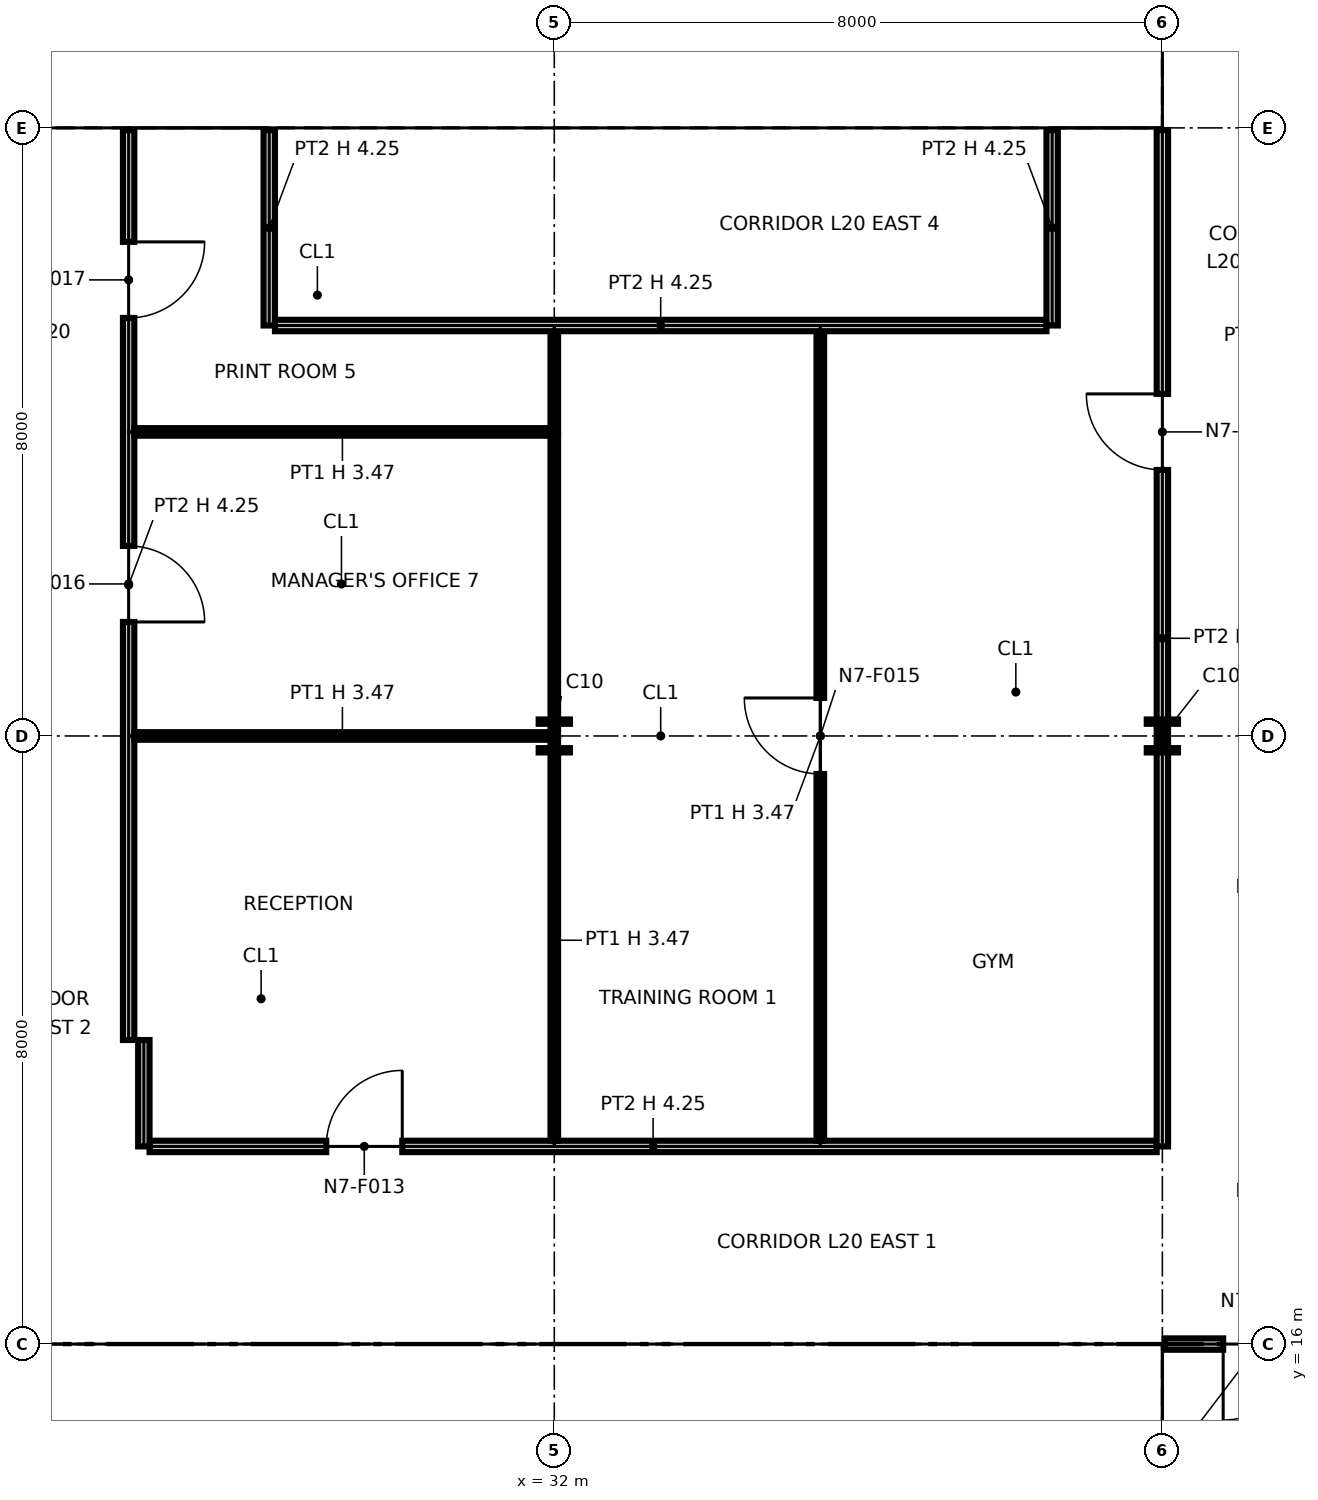
"""IFC4 building model, lengths in metres.
Left out: names, types, materials, properties, quantities, classifications, styles, units other than length and angle.
Written with IfcOpenShell. Run it as: python <this file> out.ifc"""

import sys

from ifc_helpers import new_model, si_unit, direction, frame, frame_2d, origin, origin_2d, place, context, subcontext, project, spatial, polyline, rectangle, i_section, outline, extrude, element, fill, save


model = new_model("IFC4")
c1 = context("Model", 3, precision=1e-05, world=origin(), true_north=direction((0.0, 1.0)))
c2 = subcontext(c1, "Body", "Model", "MODEL_VIEW")
j1 = project(units=[si_unit("LENGTHUNIT", "METRE"), si_unit("PLANEANGLEUNIT", "RADIAN")], contexts=[c1])
p1 = place(None, origin())
s1 = spatial("IfcSite", under=j1, at=p1, CompositionType="ELEMENT")
p2 = place(p1, origin())
s2 = spatial("IfcBuilding", under=s1, at=p2, CompositionType="ELEMENT")
p3 = place(p2, frame((0.0, 0.0, 105.2)))
s3 = spatial("IfcBuildingStorey", under=s2, at=p3, CompositionType="ELEMENT", Elevation=105.2)
p4 = place(p3, frame((32.0, 16.0, 0.0), z_axis=(0.0, 0.0, 1.0), x_axis=(1.0, 0.0, 0.0)))
e1 = element("IfcColumn", 1, at=p4, inside=s3, PredefinedType="COLUMN", context=c2, shape_type="SweptSolid", body=[
    extrude(i_section(OverallWidth=0.406, OverallDepth=0.417, WebThickness=0.03, FlangeThickness=0.048, at=origin_2d()), origin(), (0.0, 0.0, 1.0), 4.25),
])
p5 = place(p3, frame((32.0, 24.0, 0.0), z_axis=(0.0, 0.0, 1.0), x_axis=(1.0, 0.0, 0.0)))
e2 = element("IfcColumn", 2, at=p5, inside=s3, PredefinedType="COLUMN", context=c2, shape_type="SweptSolid", body=[
    extrude(i_section(OverallWidth=0.411, OverallDepth=0.434, WebThickness=0.036, FlangeThickness=0.057, at=origin_2d()), origin(), (0.0, 0.0, 1.0), 4.25),
])
p6 = place(p3, frame((32.0, 32.0, 0.0), z_axis=(0.0, 0.0, 1.0), x_axis=(1.0, 0.0, 0.0)))
e3 = element("IfcColumn", 3, at=p6, inside=s3, PredefinedType="COLUMN", context=c2, shape_type="SweptSolid", body=[
    extrude(i_section(OverallWidth=0.257, OverallDepth=0.363, WebThickness=0.013, FlangeThickness=0.022, at=origin_2d()), origin(), (0.0, 0.0, 1.0), 4.25),
])
p7 = place(p3, frame((40.0, 16.0, 0.0), z_axis=(0.0, 0.0, 1.0), x_axis=(1.0, 0.0, 0.0)))
e4 = element("IfcColumn", 4, at=p7, inside=s3, PredefinedType="COLUMN", context=c2, shape_type="SweptSolid", body=[
    extrude(i_section(OverallWidth=0.406, OverallDepth=0.417, WebThickness=0.03, FlangeThickness=0.048, at=origin_2d()), origin(), (0.0, 0.0, 1.0), 4.25),
])
p8 = place(p3, frame((40.0, 24.0, 0.0), z_axis=(0.0, 0.0, 1.0), x_axis=(1.0, 0.0, 0.0)))
e5 = element("IfcColumn", 5, at=p8, inside=s3, PredefinedType="COLUMN", context=c2, shape_type="SweptSolid", body=[
    extrude(i_section(OverallWidth=0.411, OverallDepth=0.434, WebThickness=0.036, FlangeThickness=0.057, at=origin_2d()), origin(), (0.0, 0.0, 1.0), 4.25),
])
p9 = place(p3, frame((40.0, 32.0, 0.0), z_axis=(0.0, 0.0, 1.0), x_axis=(1.0, 0.0, 0.0)))
e6 = element("IfcColumn", 6, at=p9, inside=s3, PredefinedType="COLUMN", context=c2, shape_type="SweptSolid", body=[
    extrude(i_section(OverallWidth=0.257, OverallDepth=0.363, WebThickness=0.013, FlangeThickness=0.022, at=origin_2d()), origin(), (0.0, 0.0, 1.0), 4.25),
])
p10 = place(p3, frame((24.65, 15.25, 0.0), z_axis=(0.0, 0.0, 1.0), x_axis=(1.0, 0.0, 0.0)))
e7 = element("IfcWall", 7, at=p10, inside=s3, PredefinedType="PARTITIONING", context=c2, shape_type="SweptSolid", body=[
    extrude(outline(polyline([(0.0, 0.0), (14.7, 0.0), (14.7, 4.25), (7.469, 4.25), (7.469, 3.632), (7.231, 3.632), (7.23, 4.25), (0.0, 4.25), (0.0, 0.0)])), frame((0.0, 0.1, 0.0), z_axis=(0.0, -1.0, 0.0), x_axis=(1.0, 0.0, 0.0)), (0.0, 0.0, 1.0), 0.2),
])
p11 = place(p10, frame((2.85, 0.0, 0.0)))
e8 = element("IfcOpeningElement", 8, at=p11, cuts=e7, PredefinedType="OPENING", context=c2, shape_type="SweptSolid", body=[
    extrude(rectangle(XDim=1.8, YDim=2.1, at=frame_2d((0.9, 1.05))), frame((0.0, 0.11, 0.0), z_axis=(0.0, -1.0, 0.0), x_axis=(1.0, 0.0, 0.0)), (0.0, 0.0, 1.0), 0.22),
])
p12 = place(p10, frame((9.95, 0.0, 0.0), z_axis=(0.0, 0.0, 1.0), x_axis=(-1.0, 0.0, 0.0)))
e9 = element("IfcOpeningElement", 9, at=p12, cuts=e7, PredefinedType="OPENING", context=c2, shape_type="SweptSolid", body=[
    extrude(rectangle(XDim=1.4, YDim=2.1, at=frame_2d((0.7, 1.05))), frame((0.0, 0.11, 0.0), z_axis=(0.0, -1.0, 0.0), x_axis=(1.0, 0.0, 0.0)), (0.0, 0.0, 1.0), 0.22),
])
p13 = place(p10, frame((13.4, 0.0, 0.0), z_axis=(0.0, 0.0, 1.0), x_axis=(-1.0, 0.0, 0.0)))
e10 = element("IfcOpeningElement", 10, at=p13, cuts=e7, PredefinedType="OPENING", context=c2, shape_type="SweptSolid", body=[
    extrude(rectangle(XDim=1.4, YDim=2.1, at=frame_2d((0.7, 1.05))), frame((0.0, 0.11, 0.0), z_axis=(0.0, -1.0, 0.0), x_axis=(1.0, 0.0, 0.0)), (0.0, 0.0, 1.0), 0.22),
])
p14 = place(p3, frame((32.0, 12.0, 0.0), z_axis=(0.0, 0.0, 1.0), x_axis=(0.0, 1.0, 0.0)))
e11 = element("IfcWall", 11, at=p14, inside=s3, PredefinedType="PARTITIONING", context=c2, shape_type="SweptSolid", body=[
    extrude(rectangle(XDim=3.15, YDim=0.6, at=frame_2d((1.575, 0.0))), origin(), (0.0, 0.0, 1.0), 3.632),
])
for number, where, z_axis, x_axis in (
    (12, (35.6, 8.85, 0.0), (0.0, 0.0, 1.0), (0.0, 1.0, 0.0)),
    (13, (39.25, 8.85, 0.0), (0.0, 0.0, 1.0), (0.0, 1.0, 0.0)),
):
    element("IfcWall", number, at=place(p3, frame(where, z_axis=z_axis, x_axis=x_axis)), inside=s3, PredefinedType="PARTITIONING", context=c2, shape_type="SweptSolid", body=[
        extrude(rectangle(XDim=6.3, YDim=0.2, at=frame_2d((3.15, 0.0))), origin(), (0.0, 0.0, 1.0), 4.25),
    ])
p15 = place(p3, frame((24.65, 32.75, 0.0), z_axis=(0.0, 0.0, 1.0), x_axis=(1.0, 0.0, 0.0)))
e14 = element("IfcWall", 14, at=p15, inside=s3, PredefinedType="PARTITIONING", context=c2, shape_type="SweptSolid", body=[
    extrude(outline(polyline([(0.0, 0.0), (14.7, 0.0), (14.7, 4.25), (7.469, 4.25), (7.469, 3.632), (7.231, 3.632), (7.23, 4.25), (0.0, 4.25), (0.0, 0.0)])), frame((0.0, 0.1, 0.0), z_axis=(0.0, -1.0, 0.0), x_axis=(1.0, 0.0, 0.0)), (0.0, 0.0, 1.0), 0.2),
])
p16 = place(p15, frame((4.1, 0.0, 0.0)))
e15 = element("IfcOpeningElement", 15, at=p16, cuts=e14, PredefinedType="OPENING", context=c2, shape_type="SweptSolid", body=[
    extrude(rectangle(XDim=1.8, YDim=2.1, at=frame_2d((0.9, 1.05))), frame((0.0, 0.11, 0.0), z_axis=(0.0, -1.0, 0.0), x_axis=(1.0, 0.0, 0.0)), (0.0, 0.0, 1.0), 0.22),
])
p17 = place(p15, frame((8.55, 0.0, 0.0)))
e16 = element("IfcOpeningElement", 16, at=p17, cuts=e14, PredefinedType="OPENING", context=c2, shape_type="SweptSolid", body=[
    extrude(rectangle(XDim=1.4, YDim=2.1, at=frame_2d((0.7, 1.05))), frame((0.0, 0.11, 0.0), z_axis=(0.0, -1.0, 0.0), x_axis=(1.0, 0.0, 0.0)), (0.0, 0.0, 1.0), 0.22),
])
p18 = place(p15, frame((12.0, 0.0, 0.0)))
e17 = element("IfcOpeningElement", 17, at=p18, cuts=e14, PredefinedType="OPENING", context=c2, shape_type="SweptSolid", body=[
    extrude(rectangle(XDim=1.4, YDim=2.1, at=frame_2d((0.7, 1.05))), frame((0.0, 0.11, 0.0), z_axis=(0.0, -1.0, 0.0), x_axis=(1.0, 0.0, 0.0)), (0.0, 0.0, 1.0), 0.22),
])
p19 = place(p3, frame((26.875, 32.85, 0.0), z_axis=(0.0, 0.0, 1.0), x_axis=(0.0, 1.0, 0.0)))
e18 = element("IfcWall", 18, at=p19, inside=s3, PredefinedType="PARTITIONING", context=c2, shape_type="SweptSolid", body=[
    extrude(rectangle(XDim=1.95, YDim=0.15, at=frame_2d((0.975, 0.0))), origin(), (0.0, 0.0, 1.0), 4.25),
])
p20 = place(p19, frame((0.6, 0.0, 0.0)))
e19 = element("IfcOpeningElement", 19, at=p20, cuts=e18, PredefinedType="OPENING", context=c2, shape_type="SweptSolid", body=[
    extrude(rectangle(XDim=0.9, YDim=2.1, at=frame_2d((0.45, 1.05))), frame((0.0, 0.085, 0.0), z_axis=(0.0, -1.0, 0.0), x_axis=(1.0, 0.0, 0.0)), (0.0, 0.0, 1.0), 0.17),
])
p21 = place(p3, frame((32.0, 32.85, 0.0), z_axis=(0.0, 0.0, 1.0), x_axis=(0.0, 1.0, 0.0)))
e20 = element("IfcWall", 20, at=p21, inside=s3, PredefinedType="PARTITIONING", context=c2, shape_type="SweptSolid", body=[
    extrude(rectangle(XDim=3.55, YDim=0.6, at=frame_2d((1.775, 0.0))), origin(), (0.0, 0.0, 1.0), 3.632),
])
for number, where, z_axis, x_axis in (
    (21, (35.6, 32.85, 0.0), (0.0, 0.0, 1.0), (0.0, 1.0, 0.0)),
    (22, (39.25, 32.85, 0.0), (0.0, 0.0, 1.0), (0.0, 1.0, 0.0)),
):
    element("IfcWall", number, at=place(p3, frame(where, z_axis=z_axis, x_axis=x_axis)), inside=s3, PredefinedType="PARTITIONING", context=c2, shape_type="SweptSolid", body=[
        extrude(rectangle(XDim=6.3, YDim=0.2, at=frame_2d((3.15, 0.0))), origin(), (0.0, 0.0, 1.0), 4.25),
    ])
p22 = place(p3, frame((40.03, 16.0, 0.0), z_axis=(0.0, 0.0, 1.0), x_axis=(1.0, 0.0, 0.0)))
e23 = element("IfcWall", 23, at=p22, inside=s3, PredefinedType="PARTITIONING", context=c2, shape_type="SweptSolid", body=[
    extrude(rectangle(XDim=2.495, YDim=0.15, at=frame_2d((1.248, 0.0))), origin(), (0.0, 0.0, 1.0), 3.47),
])
p23 = place(p22, frame((1.77, 0.0, 0.0), z_axis=(0.0, 0.0, 1.0), x_axis=(-1.0, 0.0, 0.0)))
e24 = element("IfcOpeningElement", 24, at=p23, cuts=e23, PredefinedType="OPENING", context=c2, shape_type="SweptSolid", body=[
    extrude(rectangle(XDim=1.0, YDim=2.1, at=frame_2d((0.5, 1.05))), frame((0.0, 0.085, 0.0), z_axis=(0.0, -1.0, 0.0), x_axis=(1.0, 0.0, 0.0)), (0.0, 0.0, 1.0), 0.17),
])
p24 = place(p3, frame((26.675, 18.6, 0.0), z_axis=(0.0, 0.0, 1.0), x_axis=(1.0, 0.0, 0.0)))
e25 = element("IfcWall", 25, at=p24, inside=s3, PredefinedType="PARTITIONING", context=c2, shape_type="SweptSolid", body=[
    extrude(rectangle(XDim=13.25, YDim=0.15, at=frame_2d((6.625, 0.0))), origin(), (0.0, 0.0, 1.0), 4.25),
])
p25 = place(p24, frame((2.325, 0.0, 0.0)))
e26 = element("IfcOpeningElement", 26, at=p25, cuts=e25, PredefinedType="OPENING", context=c2, shape_type="SweptSolid", body=[
    extrude(rectangle(XDim=1.0, YDim=2.1, at=frame_2d((0.5, 1.05))), frame((0.0, 0.085, 0.0), z_axis=(0.0, -1.0, 0.0), x_axis=(1.0, 0.0, 0.0)), (0.0, 0.0, 1.0), 0.17),
])
p26 = place(p3, frame((26.6, 18.6, 0.0), z_axis=(0.0, 0.0, 1.0), x_axis=(0.0, 1.0, 0.0)))
e27 = element("IfcWall", 27, at=p26, inside=s3, PredefinedType="PARTITIONING", context=c2, shape_type="SweptSolid", body=[
    extrude(rectangle(XDim=1.4, YDim=0.15, at=frame_2d((0.7, 0.0))), origin(), (0.0, 0.0, 1.0), 4.25),
])
p27 = place(p3, frame((32.0, 18.675, 0.0), z_axis=(0.0, 0.0, 1.0), x_axis=(0.0, 1.0, 0.0)))
e28 = element("IfcWall", 28, at=p27, inside=s3, PredefinedType="PARTITIONING", context=c2, shape_type="SweptSolid", body=[
    extrude(rectangle(XDim=5.275, YDim=0.1, at=frame_2d((2.637, 0.0))), origin(), (0.0, 0.0, 1.0), 3.47),
])
p28 = place(p3, frame((35.5, 18.675, 0.0), z_axis=(0.0, 0.0, 1.0), x_axis=(0.0, 1.0, 0.0)))
e29 = element("IfcWall", 29, at=p28, inside=s3, PredefinedType="PARTITIONING", context=c2, shape_type="SweptSolid", body=[
    extrude(rectangle(XDim=10.65, YDim=0.1, at=frame_2d((5.325, 0.0))), origin(), (0.0, 0.0, 1.0), 3.47),
])
p29 = place(p28, frame((4.825, 0.0, 0.0)))
e30 = element("IfcOpeningElement", 30, at=p29, cuts=e29, PredefinedType="OPENING", context=c2, shape_type="SweptSolid", body=[
    extrude(rectangle(XDim=1.0, YDim=2.1, at=frame_2d((0.5, 1.05))), frame((0.0, 0.06, 0.0), z_axis=(0.0, -1.0, 0.0), x_axis=(1.0, 0.0, 0.0)), (0.0, 0.0, 1.0), 0.12),
])
p30 = place(p3, frame((40.0, 18.6, 0.0), z_axis=(0.0, 0.0, 1.0), x_axis=(0.0, 1.0, 0.0)))
e31 = element("IfcWall", 31, at=p30, inside=s3, PredefinedType="PARTITIONING", context=c2, shape_type="SweptSolid", body=[
    extrude(rectangle(XDim=13.37, YDim=0.15, at=frame_2d((6.685, 0.0))), origin(), (0.0, 0.0, 1.0), 3.47),
])
p31 = place(p30, frame((8.9, 0.0, 0.0)))
e32 = element("IfcOpeningElement", 32, at=p31, cuts=e31, PredefinedType="OPENING", context=c2, shape_type="SweptSolid", body=[
    extrude(rectangle(XDim=1.0, YDim=2.1, at=frame_2d((0.5, 1.05))), frame((0.0, 0.085, 0.0), z_axis=(0.0, -1.0, 0.0), x_axis=(1.0, 0.0, 0.0)), (0.0, 0.0, 1.0), 0.17),
])
p32 = place(p3, frame((26.4, 20.0, 0.0), z_axis=(0.0, 0.0, 1.0), x_axis=(0.0, 1.0, 0.0)))
e33 = element("IfcWall", 33, at=p32, inside=s3, PredefinedType="PARTITIONING", context=c2, shape_type="SweptSolid", body=[
    extrude(outline(polyline([(0.0, 0.0), (11.97, 0.0), (11.97, 4.25), (8.3, 4.25), (8.298, 3.47), (7.702, 3.47), (7.7, 4.25), (4.3, 4.25), (4.298, 3.47), (3.702, 3.47), (3.7, 4.25), (0.0, 4.25), (0.0, 0.0)])), frame((0.0, 0.075, 0.0), z_axis=(0.0, -1.0, 0.0), x_axis=(1.0, 0.0, 0.0)), (0.0, 0.0, 1.0), 0.15),
])
p33 = place(p32, frame((6.5, 0.0, 0.0), z_axis=(0.0, 0.0, 1.0), x_axis=(-1.0, 0.0, 0.0)))
e34 = element("IfcOpeningElement", 34, at=p33, cuts=e33, PredefinedType="OPENING", context=c2, shape_type="SweptSolid", body=[
    extrude(rectangle(XDim=1.0, YDim=2.1, at=frame_2d((0.5, 1.05))), frame((0.0, 0.085, 0.0), z_axis=(0.0, -1.0, 0.0), x_axis=(1.0, 0.0, 0.0)), (0.0, 0.0, 1.0), 0.17),
])
p34 = place(p32, frame((10.5, 0.0, 0.0), z_axis=(0.0, 0.0, 1.0), x_axis=(-1.0, 0.0, 0.0)))
e35 = element("IfcOpeningElement", 35, at=p34, cuts=e33, PredefinedType="OPENING", context=c2, shape_type="SweptSolid", body=[
    extrude(rectangle(XDim=1.0, YDim=2.1, at=frame_2d((0.5, 1.05))), frame((0.0, 0.085, 0.0), z_axis=(0.0, -1.0, 0.0), x_axis=(1.0, 0.0, 0.0)), (0.0, 0.0, 1.0), 0.17),
])
p35 = place(p3, frame((26.475, 24.0, 0.0), z_axis=(0.0, 0.0, 1.0), x_axis=(1.0, 0.0, 0.0)))
e36 = element("IfcWall", 36, at=p35, inside=s3, PredefinedType="PARTITIONING", context=c2, shape_type="SweptSolid", body=[
    extrude(rectangle(XDim=5.475, YDim=0.1, at=frame_2d((2.737, 0.0))), origin(), (0.0, 0.0, 1.0), 3.47),
])
p36 = place(p3, frame((32.0, 24.0, 0.0), z_axis=(0.0, 0.0, 1.0), x_axis=(0.0, 1.0, 0.0)))
e37 = element("IfcWall", 37, at=p36, inside=s3, PredefinedType="PARTITIONING", context=c2, shape_type="SweptSolid", body=[
    extrude(rectangle(XDim=3.95, YDim=0.1, at=frame_2d((1.975, 0.0))), origin(), (0.0, 0.0, 1.0), 3.47),
])
p37 = place(p3, frame((26.475, 28.0, 0.0), z_axis=(0.0, 0.0, 1.0), x_axis=(1.0, 0.0, 0.0)))
e38 = element("IfcWall", 38, at=p37, inside=s3, PredefinedType="PARTITIONING", context=c2, shape_type="SweptSolid", body=[
    extrude(rectangle(XDim=5.475, YDim=0.1, at=frame_2d((2.737, 0.0))), origin(), (0.0, 0.0, 1.0), 3.47),
])
p38 = place(p3, frame((32.0, 28.0, 0.0), z_axis=(0.0, 0.0, 1.0), x_axis=(0.0, 1.0, 0.0)))
e39 = element("IfcWall", 39, at=p38, inside=s3, PredefinedType="PARTITIONING", context=c2, shape_type="SweptSolid", body=[
    extrude(rectangle(XDim=1.325, YDim=0.1, at=frame_2d((0.663, 0.0))), origin(), (0.0, 0.0, 1.0), 3.47),
])
p39 = place(p3, frame((28.325, 29.4, 0.0), z_axis=(0.0, 0.0, 1.0), x_axis=(1.0, 0.0, 0.0)))
e40 = element("IfcWall", 40, at=p39, inside=s3, PredefinedType="PARTITIONING", context=c2, shape_type="SweptSolid", body=[
    extrude(rectangle(XDim=10.15, YDim=0.15, at=frame_2d((5.075, 0.0))), origin(), (0.0, 0.0, 1.0), 4.25),
])
for number, where, z_axis, x_axis in (
    (41, (28.25, 29.4, 0.0), (0.0, 0.0, 1.0), (0.0, 1.0, 0.0)),
    (42, (38.55, 29.4, 0.0), (0.0, 0.0, 1.0), (0.0, 1.0, 0.0)),
):
    element("IfcWall", number, at=place(p3, frame(where, z_axis=z_axis, x_axis=x_axis)), inside=s3, PredefinedType="PARTITIONING", context=c2, shape_type="SweptSolid", body=[
        extrude(rectangle(XDim=2.57, YDim=0.15, at=frame_2d((1.285, 0.0))), origin(), (0.0, 0.0, 1.0), 4.25),
    ])
p40 = place(p11, origin())
e43 = element("IfcDoor", 43, at=p40, inside=s3, OperationType="DOUBLE_DOOR_SINGLE_SWING", PredefinedType="NOTDEFINED", context=c2, shape_type="SweptSolid", body=[
    extrude(rectangle(XDim=1.8, YDim=2.1, at=frame_2d((0.9, 1.05))), frame((0.0, 0.025, 0.0), z_axis=(0.0, -1.0, 0.0), x_axis=(1.0, 0.0, 0.0)), (0.0, 0.0, 1.0), 0.05),
])
fill(e8, e43)
p41 = place(p12, origin())
e44 = element("IfcDoor", 44, at=p41, inside=s3, OperationType="DOUBLE_DOOR_SINGLE_SWING", PredefinedType="NOTDEFINED", context=c2, shape_type="SweptSolid", body=[
    extrude(rectangle(XDim=1.4, YDim=2.1, at=frame_2d((0.7, 1.05))), frame((0.0, 0.025, 0.0), z_axis=(0.0, -1.0, 0.0), x_axis=(1.0, 0.0, 0.0)), (0.0, 0.0, 1.0), 0.05),
])
fill(e9, e44)
p42 = place(p13, origin())
e45 = element("IfcDoor", 45, at=p42, inside=s3, OperationType="DOUBLE_DOOR_SINGLE_SWING", PredefinedType="NOTDEFINED", context=c2, shape_type="SweptSolid", body=[
    extrude(rectangle(XDim=1.4, YDim=2.1, at=frame_2d((0.7, 1.05))), frame((0.0, 0.025, 0.0), z_axis=(0.0, -1.0, 0.0), x_axis=(1.0, 0.0, 0.0)), (0.0, 0.0, 1.0), 0.05),
])
fill(e10, e45)
p43 = place(p16, origin())
e46 = element("IfcDoor", 46, at=p43, inside=s3, OperationType="DOUBLE_DOOR_SINGLE_SWING", PredefinedType="NOTDEFINED", context=c2, shape_type="SweptSolid", body=[
    extrude(rectangle(XDim=1.8, YDim=2.1, at=frame_2d((0.9, 1.05))), frame((0.0, 0.025, 0.0), z_axis=(0.0, -1.0, 0.0), x_axis=(1.0, 0.0, 0.0)), (0.0, 0.0, 1.0), 0.05),
])
fill(e15, e46)
p44 = place(p17, origin())
e47 = element("IfcDoor", 47, at=p44, inside=s3, OperationType="DOUBLE_DOOR_SINGLE_SWING", PredefinedType="NOTDEFINED", context=c2, shape_type="SweptSolid", body=[
    extrude(rectangle(XDim=1.4, YDim=2.1, at=frame_2d((0.7, 1.05))), frame((0.0, 0.025, 0.0), z_axis=(0.0, -1.0, 0.0), x_axis=(1.0, 0.0, 0.0)), (0.0, 0.0, 1.0), 0.05),
])
fill(e16, e47)
p45 = place(p18, origin())
e48 = element("IfcDoor", 48, at=p45, inside=s3, OperationType="DOUBLE_DOOR_SINGLE_SWING", PredefinedType="NOTDEFINED", context=c2, shape_type="SweptSolid", body=[
    extrude(rectangle(XDim=1.4, YDim=2.1, at=frame_2d((0.7, 1.05))), frame((0.0, 0.025, 0.0), z_axis=(0.0, -1.0, 0.0), x_axis=(1.0, 0.0, 0.0)), (0.0, 0.0, 1.0), 0.05),
])
fill(e17, e48)
p46 = place(p23, origin())
e49 = element("IfcDoor", 49, at=p46, inside=s3, OperationType="SINGLE_SWING_RIGHT", PredefinedType="DOOR", context=c2, shape_type="SweptSolid", body=[
    extrude(rectangle(XDim=1.0, YDim=2.1, at=frame_2d((0.5, 1.05))), frame((0.0, 0.025, 0.0), z_axis=(0.0, -1.0, 0.0), x_axis=(1.0, 0.0, 0.0)), (0.0, 0.0, 1.0), 0.05),
])
fill(e24, e49)
p47 = place(p25, origin())
e50 = element("IfcDoor", 50, at=p47, inside=s3, OperationType="SINGLE_SWING_RIGHT", PredefinedType="DOOR", context=c2, shape_type="SweptSolid", body=[
    extrude(rectangle(XDim=1.0, YDim=2.1, at=frame_2d((0.5, 1.05))), frame((0.0, 0.025, 0.0), z_axis=(0.0, -1.0, 0.0), x_axis=(1.0, 0.0, 0.0)), (0.0, 0.0, 1.0), 0.05),
])
fill(e26, e50)
p48 = place(p31, origin())
e51 = element("IfcDoor", 51, at=p48, inside=s3, OperationType="SINGLE_SWING_RIGHT", PredefinedType="DOOR", context=c2, shape_type="SweptSolid", body=[
    extrude(rectangle(XDim=1.0, YDim=2.1, at=frame_2d((0.5, 1.05))), frame((0.0, 0.025, 0.0), z_axis=(0.0, -1.0, 0.0), x_axis=(1.0, 0.0, 0.0)), (0.0, 0.0, 1.0), 0.05),
])
fill(e32, e51)
p49 = place(p29, origin())
e52 = element("IfcDoor", 52, at=p49, inside=s3, OperationType="SINGLE_SWING_RIGHT", PredefinedType="DOOR", context=c2, shape_type="SweptSolid", body=[
    extrude(rectangle(XDim=1.0, YDim=2.1, at=frame_2d((0.5, 1.05))), frame((0.0, 0.025, 0.0), z_axis=(0.0, -1.0, 0.0), x_axis=(1.0, 0.0, 0.0)), (0.0, 0.0, 1.0), 0.05),
])
fill(e30, e52)
p50 = place(p33, origin())
e53 = element("IfcDoor", 53, at=p50, inside=s3, OperationType="SINGLE_SWING_RIGHT", PredefinedType="DOOR", context=c2, shape_type="SweptSolid", body=[
    extrude(rectangle(XDim=1.0, YDim=2.1, at=frame_2d((0.5, 1.05))), frame((0.0, 0.025, 0.0), z_axis=(0.0, -1.0, 0.0), x_axis=(1.0, 0.0, 0.0)), (0.0, 0.0, 1.0), 0.05),
])
fill(e34, e53)
p51 = place(p34, origin())
e54 = element("IfcDoor", 54, at=p51, inside=s3, OperationType="SINGLE_SWING_LEFT", PredefinedType="DOOR", context=c2, shape_type="SweptSolid", body=[
    extrude(rectangle(XDim=1.0, YDim=2.1, at=frame_2d((0.5, 1.05))), frame((0.0, 0.025, 0.0), z_axis=(0.0, -1.0, 0.0), x_axis=(1.0, 0.0, 0.0)), (0.0, 0.0, 1.0), 0.05),
])
fill(e35, e54)
save(model, sys.argv[1])
